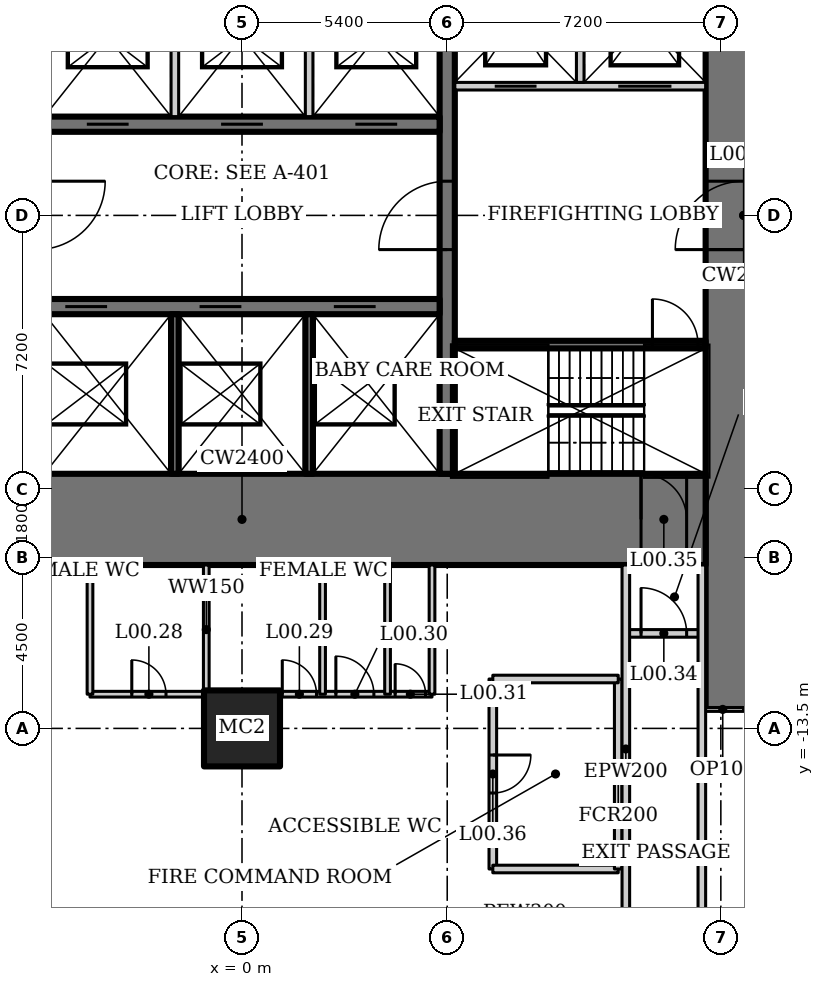
"""IFC4 building model, lengths in metres.
Left out: names, types, materials, properties, quantities, classifications, styles, units other than length and angle.
Written with IfcOpenShell. Run it as: python <this file> out.ifc"""

import sys

from ifc_helpers import new_model, si_unit, direction, frame, frame_2d, origin, origin_2d, place, context, subcontext, project, spatial, rectangle, hollow_rectangle, extrude, element, fill, save


model = new_model("IFC4")
c1 = context("Model", 3, precision=1e-05, world=origin(), true_north=direction((0.0, 1.0)))
c2 = subcontext(c1, "Body", "Model", "MODEL_VIEW")
j1 = project(units=[si_unit("LENGTHUNIT", "METRE"), si_unit("PLANEANGLEUNIT", "RADIAN")], contexts=[c1])
p1 = place(None, origin())
s1 = spatial("IfcSite", under=j1, at=p1, CompositionType="ELEMENT")
p2 = place(p1, origin())
s2 = spatial("IfcBuilding", under=s1, at=p2, CompositionType="ELEMENT")
p3 = place(p2, origin())
s3 = spatial("IfcBuildingStorey", under=s2, at=p3, CompositionType="ELEMENT", Elevation=0.0)
p4 = place(p3, frame((0.0, -13.5, 0.0), z_axis=(0.0, 0.0, 1.0), x_axis=(1.0, 0.0, 0.0)))
e1 = element("IfcColumn", 1, at=p4, inside=s3, PredefinedType="COLUMN", context=c2, shape_type="SweptSolid", body=[
    extrude(hollow_rectangle(XDim=2.0, YDim=2.0, WallThickness=0.17, at=origin_2d()), origin(), (0.0, 0.0, 1.0), 6.5),
])
p5 = place(p3, frame((13.2, -13.0, 0.0), z_axis=(0.0, 0.0, 1.0), x_axis=(0.0, 1.0, 0.0)))
e2 = element("IfcWall", 2, at=p5, inside=s3, PredefinedType="SHEAR", context=c2, shape_type="SweptSolid", body=[
    extrude(rectangle(XDim=26.0, YDim=2.0, at=frame_2d((13.0, 0.0))), origin(), (0.0, 0.0, 1.0), 6.5),
])
p6 = place(p5, frame((12.1, 0.0, 0.0)))
e3 = element("IfcOpeningElement", 3, at=p6, cuts=e2, PredefinedType="OPENING", context=c2, shape_type="SweptSolid", body=[
    extrude(rectangle(XDim=1.8, YDim=2.1, at=frame_2d((0.9, 1.05))), frame((0.0, 1.01, 0.0), z_axis=(0.0, -1.0, 0.0), x_axis=(1.0, 0.0, 0.0)), (0.0, 0.0, 1.0), 2.02),
])
p7 = place(p3, frame((-12.2, -8.0, 0.0), z_axis=(0.0, 0.0, 1.0), x_axis=(1.0, 0.0, 0.0)))
e4 = element("IfcWall", 4, at=p7, inside=s3, PredefinedType="SHEAR", context=c2, shape_type="SweptSolid", body=[
    extrude(rectangle(XDim=24.4, YDim=2.4, at=frame_2d((12.2, 0.0))), origin(), (0.0, 0.0, 1.0), 6.5),
])
p8 = place(p7, frame((0.5, 0.0, 0.0)))
e5 = element("IfcOpeningElement", 5, at=p8, cuts=e4, PredefinedType="OPENING", context=c2, shape_type="SweptSolid", body=[
    extrude(rectangle(XDim=1.2, YDim=2.1, at=frame_2d((0.6, 1.05))), frame((0.0, 1.21, 0.0), z_axis=(0.0, -1.0, 0.0), x_axis=(1.0, 0.0, 0.0)), (0.0, 0.0, 1.0), 2.42),
])
p9 = place(p7, frame((22.7, 0.0, 0.0)))
e6 = element("IfcOpeningElement", 6, at=p9, cuts=e4, PredefinedType="OPENING", context=c2, shape_type="SweptSolid", body=[
    extrude(rectangle(XDim=1.2, YDim=2.1, at=frame_2d((0.6, 1.05))), frame((0.0, 1.21, 0.0), z_axis=(0.0, -1.0, 0.0), x_axis=(1.0, 0.0, 0.0)), (0.0, 0.0, 1.0), 2.42),
])
p10 = place(p3, frame((5.4, -6.8, 0.0), z_axis=(0.0, 0.0, 1.0), x_axis=(0.0, 1.0, 0.0)))
e7 = element("IfcWall", 7, at=p10, inside=s3, PredefinedType="SHEAR", context=c2, shape_type="SweptSolid", body=[
    extrude(rectangle(XDim=13.6, YDim=0.4, at=frame_2d((6.8, 0.0))), origin(), (0.0, 0.0, 1.0), 6.5),
])
p11 = place(p10, frame((5.9, 0.0, 0.0)))
e8 = element("IfcOpeningElement", 8, at=p11, cuts=e7, PredefinedType="OPENING", context=c2, shape_type="SweptSolid", body=[
    extrude(rectangle(XDim=1.8, YDim=2.1, at=frame_2d((0.9, 1.05))), frame((0.0, 0.21, 0.0), z_axis=(0.0, -1.0, 0.0), x_axis=(1.0, 0.0, 0.0)), (0.0, 0.0, 1.0), 0.42),
])
p12 = place(p3, frame((-5.2, -2.4, 0.0), z_axis=(0.0, 0.0, 1.0), x_axis=(1.0, 0.0, 0.0)))
e9 = element("IfcWall", 9, at=p12, inside=s3, PredefinedType="SHEAR", context=c2, shape_type="SweptSolid", body=[
    extrude(rectangle(XDim=10.4, YDim=0.4, at=frame_2d((5.2, 0.0))), origin(), (0.0, 0.0, 1.0), 6.5),
])
p13 = place(p12, frame((0.55, 0.0, 0.0)))
e10 = element("IfcOpeningElement", 10, at=p13, cuts=e9, PredefinedType="OPENING", context=c2, shape_type="SweptSolid", body=[
    extrude(rectangle(XDim=1.1, YDim=2.2, at=frame_2d((0.55, 1.1))), frame((0.0, 0.21, 0.0), z_axis=(0.0, -1.0, 0.0), x_axis=(1.0, 0.0, 0.0)), (0.0, 0.0, 1.0), 0.42),
])
p14 = place(p12, frame((4.083, 0.0, 0.0)))
e11 = element("IfcOpeningElement", 11, at=p14, cuts=e9, PredefinedType="OPENING", context=c2, shape_type="SweptSolid", body=[
    extrude(rectangle(XDim=1.1, YDim=2.2, at=frame_2d((0.55, 1.1))), frame((0.0, 0.21, 0.0), z_axis=(0.0, -1.0, 0.0), x_axis=(1.0, 0.0, 0.0)), (0.0, 0.0, 1.0), 0.42),
])
p15 = place(p12, frame((7.617, 0.0, 0.0)))
e12 = element("IfcOpeningElement", 12, at=p15, cuts=e9, PredefinedType="OPENING", context=c2, shape_type="SweptSolid", body=[
    extrude(rectangle(XDim=1.1, YDim=2.2, at=frame_2d((0.55, 1.1))), frame((0.0, 0.21, 0.0), z_axis=(0.0, -1.0, 0.0), x_axis=(1.0, 0.0, 0.0)), (0.0, 0.0, 1.0), 0.42),
])
for number, where, z_axis, x_axis in (
    (13, (-1.767, -2.6, 0.0), (0.0, 0.0, 1.0), (0.0, -1.0, 0.0)),
    (14, (1.767, -2.6, 0.0), (0.0, 0.0, 1.0), (0.0, -1.0, 0.0)),
):
    element("IfcWall", number, at=place(p3, frame(where, z_axis=z_axis, x_axis=x_axis)), inside=s3, PredefinedType="SOLIDWALL", context=c2, shape_type="SweptSolid", body=[
        extrude(rectangle(XDim=4.2, YDim=0.2, at=frame_2d((2.1, 0.0))), origin(), (0.0, 0.0, 1.0), 6.5),
    ])
p16 = place(p3, frame((5.2, 2.4, 0.0), z_axis=(0.0, 0.0, 1.0), x_axis=(-1.0, 0.0, 0.0)))
e15 = element("IfcWall", 15, at=p16, inside=s3, PredefinedType="SHEAR", context=c2, shape_type="SweptSolid", body=[
    extrude(rectangle(XDim=10.4, YDim=0.4, at=frame_2d((5.2, 0.0))), origin(), (0.0, 0.0, 1.0), 6.5),
])
p17 = place(p16, frame((8.183, 0.0, 0.0)))
e16 = element("IfcOpeningElement", 16, at=p17, cuts=e15, PredefinedType="OPENING", context=c2, shape_type="SweptSolid", body=[
    extrude(rectangle(XDim=1.1, YDim=2.2, at=frame_2d((0.55, 1.1))), frame((0.0, 0.21, 0.0), z_axis=(0.0, -1.0, 0.0), x_axis=(1.0, 0.0, 0.0)), (0.0, 0.0, 1.0), 0.42),
])
p18 = place(p16, frame((4.65, 0.0, 0.0)))
e17 = element("IfcOpeningElement", 17, at=p18, cuts=e15, PredefinedType="OPENING", context=c2, shape_type="SweptSolid", body=[
    extrude(rectangle(XDim=1.1, YDim=2.2, at=frame_2d((0.55, 1.1))), frame((0.0, 0.21, 0.0), z_axis=(0.0, -1.0, 0.0), x_axis=(1.0, 0.0, 0.0)), (0.0, 0.0, 1.0), 0.42),
])
p19 = place(p16, frame((1.117, 0.0, 0.0)))
e18 = element("IfcOpeningElement", 18, at=p19, cuts=e15, PredefinedType="OPENING", context=c2, shape_type="SweptSolid", body=[
    extrude(rectangle(XDim=1.1, YDim=2.2, at=frame_2d((0.55, 1.1))), frame((0.0, 0.21, 0.0), z_axis=(0.0, -1.0, 0.0), x_axis=(1.0, 0.0, 0.0)), (0.0, 0.0, 1.0), 0.42),
])
for number, where, z_axis, x_axis in (
    (19, (-1.767, 2.6, 0.0), (0.0, 0.0, 1.0), (0.0, 1.0, 0.0)),
    (20, (1.767, 2.6, 0.0), (0.0, 0.0, 1.0), (0.0, 1.0, 0.0)),
):
    element("IfcWall", number, at=place(p3, frame(where, z_axis=z_axis, x_axis=x_axis)), inside=s3, PredefinedType="SOLIDWALL", context=c2, shape_type="SweptSolid", body=[
        extrude(rectangle(XDim=4.2, YDim=0.2, at=frame_2d((2.1, 0.0))), origin(), (0.0, 0.0, 1.0), 6.5),
    ])
p20 = place(p3, frame((5.6, -3.4, 0.0), z_axis=(0.0, 0.0, 1.0), x_axis=(1.0, 0.0, 0.0)))
e21 = element("IfcWall", 21, at=p20, inside=s3, PredefinedType="SHEAR", context=c2, shape_type="SweptSolid", body=[
    extrude(rectangle(XDim=6.6, YDim=0.2, at=frame_2d((3.3, 0.0))), origin(), (0.0, 0.0, 1.0), 6.5),
])
p21 = place(p20, frame((5.2, 0.0, 0.0)))
e22 = element("IfcOpeningElement", 22, at=p21, cuts=e21, PredefinedType="OPENING", context=c2, shape_type="SweptSolid", body=[
    extrude(rectangle(XDim=1.2, YDim=2.1, at=frame_2d((0.6, 1.05))), frame((0.0, 0.11, 0.0), z_axis=(0.0, -1.0, 0.0), x_axis=(1.0, 0.0, 0.0)), (0.0, 0.0, 1.0), 0.22),
])
p22 = place(p3, frame((12.2, 3.4, 0.0), z_axis=(0.0, 0.0, 1.0), x_axis=(-1.0, 0.0, 0.0)))
e23 = element("IfcWall", 23, at=p22, inside=s3, PredefinedType="SOLIDWALL", context=c2, shape_type="SweptSolid", body=[
    extrude(rectangle(XDim=6.6, YDim=0.2, at=frame_2d((3.3, 0.0))), origin(), (0.0, 0.0, 1.0), 6.5),
])
p23 = place(p22, frame((4.45, 0.0, 0.0)))
e24 = element("IfcOpeningElement", 24, at=p23, cuts=e23, PredefinedType="OPENING", context=c2, shape_type="SweptSolid", body=[
    extrude(rectangle(XDim=1.1, YDim=2.2, at=frame_2d((0.55, 1.1))), frame((0.0, 0.11, 0.0), z_axis=(0.0, -1.0, 0.0), x_axis=(1.0, 0.0, 0.0)), (0.0, 0.0, 1.0), 0.22),
])
p24 = place(p22, frame((0.9, 0.0, 0.0)))
e25 = element("IfcOpeningElement", 25, at=p24, cuts=e23, PredefinedType="OPENING", context=c2, shape_type="SweptSolid", body=[
    extrude(rectangle(XDim=1.4, YDim=2.2, at=frame_2d((0.7, 1.1))), frame((0.0, 0.11, 0.0), z_axis=(0.0, -1.0, 0.0), x_axis=(1.0, 0.0, 0.0)), (0.0, 0.0, 1.0), 0.22),
])
p25 = place(p3, frame((8.9, 3.5, 0.0), z_axis=(0.0, 0.0, 1.0), x_axis=(0.0, 1.0, 0.0)))
e26 = element("IfcWall", 26, at=p25, inside=s3, PredefinedType="SOLIDWALL", context=c2, shape_type="SweptSolid", body=[
    extrude(rectangle(XDim=3.3, YDim=0.2, at=frame_2d((1.65, 0.0))), origin(), (0.0, 0.0, 1.0), 6.5),
])
p26 = place(p3, frame((-4.0, -12.6, 0.0), z_axis=(0.0, 0.0, 1.0), x_axis=(1.0, 0.0, 0.0)))
e27 = element("IfcWall", 27, at=p26, inside=s3, PredefinedType="SOLIDWALL", context=c2, shape_type="SweptSolid", body=[
    extrude(rectangle(XDim=9.0, YDim=0.15, at=frame_2d((4.5, 0.0))), origin(), (0.0, 0.0, 1.0), 6.3),
])
p27 = place(p26, frame((1.1, 0.0, 0.0)))
e28 = element("IfcOpeningElement", 28, at=p27, cuts=e27, PredefinedType="OPENING", context=c2, shape_type="SweptSolid", body=[
    extrude(rectangle(XDim=0.9, YDim=2.1, at=frame_2d((0.45, 1.05))), frame((0.0, 0.085, 0.0), z_axis=(0.0, -1.0, 0.0), x_axis=(1.0, 0.0, 0.0)), (0.0, 0.0, 1.0), 0.17),
])
p28 = place(p26, frame((5.06, 0.0, 0.0)))
e29 = element("IfcOpeningElement", 29, at=p28, cuts=e27, PredefinedType="OPENING", context=c2, shape_type="SweptSolid", body=[
    extrude(rectangle(XDim=0.9, YDim=2.1, at=frame_2d((0.45, 1.05))), frame((0.0, 0.085, 0.0), z_axis=(0.0, -1.0, 0.0), x_axis=(1.0, 0.0, 0.0)), (0.0, 0.0, 1.0), 0.17),
])
p29 = place(p26, frame((6.47, 0.0, 0.0)))
e30 = element("IfcOpeningElement", 30, at=p29, cuts=e27, PredefinedType="OPENING", context=c2, shape_type="SweptSolid", body=[
    extrude(rectangle(XDim=1.0, YDim=2.1, at=frame_2d((0.5, 1.05))), frame((0.0, 0.085, 0.0), z_axis=(0.0, -1.0, 0.0), x_axis=(1.0, 0.0, 0.0)), (0.0, 0.0, 1.0), 0.17),
])
p30 = place(p26, frame((8.03, 0.0, 0.0)))
e31 = element("IfcOpeningElement", 31, at=p30, cuts=e27, PredefinedType="OPENING", context=c2, shape_type="SweptSolid", body=[
    extrude(rectangle(XDim=0.8, YDim=2.1, at=frame_2d((0.4, 1.05))), frame((0.0, 0.085, 0.0), z_axis=(0.0, -1.0, 0.0), x_axis=(1.0, 0.0, 0.0)), (0.0, 0.0, 1.0), 0.17),
])
for number, where, z_axis, x_axis in (
    (32, (-4.0, -9.2, 0.0), (0.0, 0.0, 1.0), (0.0, -1.0, 0.0)),
    (33, (5.0, -9.2, 0.0), (0.0, 0.0, 1.0), (0.0, -1.0, 0.0)),
    (34, (-0.94, -9.2, 0.0), (0.0, 0.0, 1.0), (0.0, -1.0, 0.0)),
):
    element("IfcWall", number, at=place(p3, frame(where, z_axis=z_axis, x_axis=x_axis)), inside=s3, PredefinedType="SOLIDWALL", context=c2, shape_type="SweptSolid", body=[
        extrude(rectangle(XDim=3.4, YDim=0.15, at=frame_2d((1.7, 0.0))), origin(), (0.0, 0.0, 1.0), 6.3),
    ])
p31 = place(p3, frame((2.12, -9.2, 0.0), z_axis=(0.0, 0.0, 1.0), x_axis=(0.0, -1.0, 0.0)))
e35 = element("IfcWall", 35, at=p31, inside=s3, PredefinedType="SOLIDWALL", context=c2, shape_type="SweptSolid", body=[
    extrude(rectangle(XDim=3.4, YDim=0.15, at=frame_2d((1.7, 0.0))), origin(), (0.0, 0.0, 1.0), 5.378),
])
p32 = place(p3, frame((3.83, -9.2, 0.0), z_axis=(0.0, 0.0, 1.0), x_axis=(0.0, -1.0, 0.0)))
e36 = element("IfcWall", 36, at=p32, inside=s3, PredefinedType="SOLIDWALL", context=c2, shape_type="SweptSolid", body=[
    extrude(rectangle(XDim=3.4, YDim=0.15, at=frame_2d((1.7, 0.0))), origin(), (0.0, 0.0, 1.0), 6.3),
])
p33 = place(p3, frame((10.1, -11.0, 0.0), z_axis=(0.0, 0.0, 1.0), x_axis=(1.0, 0.0, 0.0)))
e37 = element("IfcWall", 37, at=p33, inside=s3, PredefinedType="SOLIDWALL", context=c2, shape_type="SweptSolid", body=[
    extrude(rectangle(XDim=2.0, YDim=0.2, at=frame_2d((1.0, 0.0))), origin(), (0.0, 0.0, 1.0), 6.3),
])
p34 = place(p33, frame((0.4, 0.0, 0.0)))
e38 = element("IfcOpeningElement", 38, at=p34, cuts=e37, PredefinedType="OPENING", context=c2, shape_type="SweptSolid", body=[
    extrude(rectangle(XDim=1.2, YDim=2.1, at=frame_2d((0.6, 1.05))), frame((0.0, 0.11, 0.0), z_axis=(0.0, -1.0, 0.0), x_axis=(1.0, 0.0, 0.0)), (0.0, 0.0, 1.0), 0.22),
])
p35 = place(p3, frame((6.6, -12.2, 0.0), z_axis=(0.0, 0.0, 1.0), x_axis=(0.0, -1.0, 0.0)))
e39 = element("IfcWall", 39, at=p35, inside=s3, PredefinedType="SOLIDWALL", context=c2, shape_type="SweptSolid", body=[
    extrude(rectangle(XDim=5.0, YDim=0.2, at=frame_2d((2.5, 0.0))), origin(), (0.0, 0.0, 1.0), 6.3),
])
p36 = place(p35, frame((2.0, 0.0, 0.0)))
e40 = element("IfcOpeningElement", 40, at=p36, cuts=e39, PredefinedType="OPENING", context=c2, shape_type="SweptSolid", body=[
    extrude(rectangle(XDim=1.0, YDim=2.1, at=frame_2d((0.5, 1.05))), frame((0.0, 0.11, 0.0), z_axis=(0.0, -1.0, 0.0), x_axis=(1.0, 0.0, 0.0)), (0.0, 0.0, 1.0), 0.22),
])
p37 = place(p3, frame((6.6, -17.2, 0.0), z_axis=(0.0, 0.0, 1.0), x_axis=(1.0, 0.0, 0.0)))
e41 = element("IfcWall", 41, at=p37, inside=s3, PredefinedType="SOLIDWALL", context=c2, shape_type="SweptSolid", body=[
    extrude(rectangle(XDim=3.3, YDim=0.2, at=frame_2d((1.65, 0.0))), origin(), (0.0, 0.0, 1.0), 6.3),
])
p38 = place(p3, frame((9.9, -17.2, 0.0), z_axis=(0.0, 0.0, 1.0), x_axis=(0.0, 1.0, 0.0)))
e42 = element("IfcWall", 42, at=p38, inside=s3, PredefinedType="SOLIDWALL", context=c2, shape_type="SweptSolid", body=[
    extrude(rectangle(XDim=5.0, YDim=0.2, at=frame_2d((2.5, 0.0))), origin(), (0.0, 0.0, 1.0), 6.3),
])
p39 = place(p3, frame((9.9, -12.2, 0.0), z_axis=(0.0, 0.0, 1.0), x_axis=(-1.0, 0.0, 0.0)))
e43 = element("IfcWall", 43, at=p39, inside=s3, PredefinedType="SOLIDWALL", context=c2, shape_type="SweptSolid", body=[
    extrude(rectangle(XDim=3.3, YDim=0.2, at=frame_2d((1.65, 0.0))), origin(), (0.0, 0.0, 1.0), 6.3),
])
p40 = place(p3, frame((13.2, -13.0, 0.0), z_axis=(0.0, 0.0, 1.0), x_axis=(-1.0, 0.0, 0.0)))
e44 = element("IfcWall", 44, at=p40, inside=s3, PredefinedType="PARTITIONING", context=c2, shape_type="SweptSolid", body=[
    extrude(rectangle(XDim=1.1, YDim=0.1, at=frame_2d((0.55, 0.0))), origin(), (0.0, 0.0, 1.0), 6.3),
])
p41 = place(p3, frame((10.1, -9.2, 0.0), z_axis=(0.0, 0.0, 1.0), x_axis=(0.0, -1.0, 0.0)))
e45 = element("IfcWall", 45, at=p41, inside=s3, PredefinedType="SOLIDWALL", context=c2, shape_type="SweptSolid", body=[
    extrude(rectangle(XDim=9.684, YDim=0.2, at=frame_2d((4.842, 0.0))), origin(), (0.0, 0.0, 1.0), 6.3),
])
p42 = place(p3, frame((12.1, -20.146, 0.0), z_axis=(0.0, 0.0, 1.0), x_axis=(0.0, 1.0, 0.0)))
e46 = element("IfcWall", 46, at=p42, inside=s3, PredefinedType="SOLIDWALL", context=c2, shape_type="SweptSolid", body=[
    extrude(rectangle(XDim=10.946, YDim=0.2, at=frame_2d((5.473, 0.0))), origin(), (0.0, 0.0, 1.0), 6.3),
])
p43 = place(p11, origin())
e47 = element("IfcDoor", 47, at=p43, inside=s3, OperationType="DOUBLE_DOOR_DOUBLE_SWING", PredefinedType="DOOR", context=c2, shape_type="SweptSolid", body=[
    extrude(rectangle(XDim=1.8, YDim=2.1, at=frame_2d((0.9, 1.05))), frame((0.0, 0.025, 0.0), z_axis=(0.0, -1.0, 0.0), x_axis=(1.0, 0.0, 0.0)), (0.0, 0.0, 1.0), 0.05),
])
fill(e8, e47)
p44 = place(p21, origin())
e48 = element("IfcDoor", 48, at=p44, inside=s3, OperationType="SINGLE_SWING_RIGHT", PredefinedType="DOOR", context=c2, shape_type="SweptSolid", body=[
    extrude(rectangle(XDim=1.2, YDim=2.1, at=frame_2d((0.6, 1.05))), frame((0.0, 0.025, 0.0), z_axis=(0.0, -1.0, 0.0), x_axis=(1.0, 0.0, 0.0)), (0.0, 0.0, 1.0), 0.05),
])
fill(e22, e48)
p45 = place(p6, origin())
e49 = element("IfcDoor", 49, at=p45, inside=s3, OperationType="DOUBLE_DOOR_DOUBLE_SWING", PredefinedType="DOOR", context=c2, shape_type="SweptSolid", body=[
    extrude(rectangle(XDim=1.8, YDim=2.1, at=frame_2d((0.9, 1.05))), frame((0.0, 0.025, 0.0), z_axis=(0.0, -1.0, 0.0), x_axis=(1.0, 0.0, 0.0)), (0.0, 0.0, 1.0), 0.05),
])
fill(e3, e49)
p46 = place(p17, origin())
e50 = element("IfcDoor", 50, at=p46, inside=s3, OperationType="DOUBLE_DOOR_SLIDING", PredefinedType="DOOR", context=c2, shape_type="SweptSolid", body=[
    extrude(rectangle(XDim=1.1, YDim=2.2, at=frame_2d((0.55, 1.1))), frame((0.0, 0.025, 0.0), z_axis=(0.0, -1.0, 0.0), x_axis=(1.0, 0.0, 0.0)), (0.0, 0.0, 1.0), 0.05),
])
fill(e16, e50)
p47 = place(p13, origin())
e51 = element("IfcDoor", 51, at=p47, inside=s3, OperationType="DOUBLE_DOOR_SLIDING", PredefinedType="DOOR", context=c2, shape_type="SweptSolid", body=[
    extrude(rectangle(XDim=1.1, YDim=2.2, at=frame_2d((0.55, 1.1))), frame((0.0, 0.025, 0.0), z_axis=(0.0, -1.0, 0.0), x_axis=(1.0, 0.0, 0.0)), (0.0, 0.0, 1.0), 0.05),
])
fill(e10, e51)
p48 = place(p18, origin())
e52 = element("IfcDoor", 52, at=p48, inside=s3, OperationType="DOUBLE_DOOR_SLIDING", PredefinedType="DOOR", context=c2, shape_type="SweptSolid", body=[
    extrude(rectangle(XDim=1.1, YDim=2.2, at=frame_2d((0.55, 1.1))), frame((0.0, 0.025, 0.0), z_axis=(0.0, -1.0, 0.0), x_axis=(1.0, 0.0, 0.0)), (0.0, 0.0, 1.0), 0.05),
])
fill(e17, e52)
p49 = place(p14, origin())
e53 = element("IfcDoor", 53, at=p49, inside=s3, OperationType="DOUBLE_DOOR_SLIDING", PredefinedType="DOOR", context=c2, shape_type="SweptSolid", body=[
    extrude(rectangle(XDim=1.1, YDim=2.2, at=frame_2d((0.55, 1.1))), frame((0.0, 0.025, 0.0), z_axis=(0.0, -1.0, 0.0), x_axis=(1.0, 0.0, 0.0)), (0.0, 0.0, 1.0), 0.05),
])
fill(e11, e53)
p50 = place(p19, origin())
e54 = element("IfcDoor", 54, at=p50, inside=s3, OperationType="DOUBLE_DOOR_SLIDING", PredefinedType="DOOR", context=c2, shape_type="SweptSolid", body=[
    extrude(rectangle(XDim=1.1, YDim=2.2, at=frame_2d((0.55, 1.1))), frame((0.0, 0.025, 0.0), z_axis=(0.0, -1.0, 0.0), x_axis=(1.0, 0.0, 0.0)), (0.0, 0.0, 1.0), 0.05),
])
fill(e18, e54)
p51 = place(p15, origin())
e55 = element("IfcDoor", 55, at=p51, inside=s3, OperationType="DOUBLE_DOOR_SLIDING", PredefinedType="DOOR", context=c2, shape_type="SweptSolid", body=[
    extrude(rectangle(XDim=1.1, YDim=2.2, at=frame_2d((0.55, 1.1))), frame((0.0, 0.025, 0.0), z_axis=(0.0, -1.0, 0.0), x_axis=(1.0, 0.0, 0.0)), (0.0, 0.0, 1.0), 0.05),
])
fill(e12, e55)
p52 = place(p23, origin())
e56 = element("IfcDoor", 56, at=p52, inside=s3, OperationType="DOUBLE_DOOR_SLIDING", PredefinedType="DOOR", context=c2, shape_type="SweptSolid", body=[
    extrude(rectangle(XDim=1.1, YDim=2.2, at=frame_2d((0.55, 1.1))), frame((0.0, 0.025, 0.0), z_axis=(0.0, -1.0, 0.0), x_axis=(1.0, 0.0, 0.0)), (0.0, 0.0, 1.0), 0.05),
])
fill(e24, e56)
p53 = place(p24, origin())
e57 = element("IfcDoor", 57, at=p53, inside=s3, OperationType="DOUBLE_DOOR_SLIDING", PredefinedType="DOOR", context=c2, shape_type="SweptSolid", body=[
    extrude(rectangle(XDim=1.4, YDim=2.2, at=frame_2d((0.7, 1.1))), frame((0.0, 0.025, 0.0), z_axis=(0.0, -1.0, 0.0), x_axis=(1.0, 0.0, 0.0)), (0.0, 0.0, 1.0), 0.05),
])
fill(e25, e57)
p54 = place(p27, origin())
e58 = element("IfcDoor", 58, at=p54, inside=s3, OperationType="SINGLE_SWING_LEFT", PredefinedType="DOOR", context=c2, shape_type="SweptSolid", body=[
    extrude(rectangle(XDim=0.9, YDim=2.1, at=frame_2d((0.45, 1.05))), frame((0.0, 0.025, 0.0), z_axis=(0.0, -1.0, 0.0), x_axis=(1.0, 0.0, 0.0)), (0.0, 0.0, 1.0), 0.05),
])
fill(e28, e58)
p55 = place(p28, origin())
e59 = element("IfcDoor", 59, at=p55, inside=s3, OperationType="SINGLE_SWING_LEFT", PredefinedType="DOOR", context=c2, shape_type="SweptSolid", body=[
    extrude(rectangle(XDim=0.9, YDim=2.1, at=frame_2d((0.45, 1.05))), frame((0.0, 0.025, 0.0), z_axis=(0.0, -1.0, 0.0), x_axis=(1.0, 0.0, 0.0)), (0.0, 0.0, 1.0), 0.05),
])
fill(e29, e59)
p56 = place(p29, origin())
e60 = element("IfcDoor", 60, at=p56, inside=s3, OperationType="SINGLE_SWING_LEFT", PredefinedType="DOOR", context=c2, shape_type="SweptSolid", body=[
    extrude(rectangle(XDim=1.0, YDim=2.1, at=frame_2d((0.5, 1.05))), frame((0.0, 0.025, 0.0), z_axis=(0.0, -1.0, 0.0), x_axis=(1.0, 0.0, 0.0)), (0.0, 0.0, 1.0), 0.05),
])
fill(e30, e60)
p57 = place(p30, origin())
e61 = element("IfcDoor", 61, at=p57, inside=s3, OperationType="SINGLE_SWING_LEFT", PredefinedType="DOOR", context=c2, shape_type="SweptSolid", body=[
    extrude(rectangle(XDim=0.8, YDim=2.1, at=frame_2d((0.4, 1.05))), frame((0.0, 0.025, 0.0), z_axis=(0.0, -1.0, 0.0), x_axis=(1.0, 0.0, 0.0)), (0.0, 0.0, 1.0), 0.05),
])
fill(e31, e61)
p58 = place(p34, origin())
e62 = element("IfcDoor", 62, at=p58, inside=s3, OperationType="SINGLE_SWING_RIGHT", PredefinedType="DOOR", context=c2, shape_type="SweptSolid", body=[
    extrude(rectangle(XDim=1.2, YDim=2.1, at=frame_2d((0.6, 1.05))), frame((0.0, 0.025, 0.0), z_axis=(0.0, -1.0, 0.0), x_axis=(1.0, 0.0, 0.0)), (0.0, 0.0, 1.0), 0.05),
])
fill(e38, e62)
p59 = place(p9, origin())
e63 = element("IfcDoor", 63, at=p59, inside=s3, OperationType="SINGLE_SWING_LEFT", PredefinedType="DOOR", context=c2, shape_type="SweptSolid", body=[
    extrude(rectangle(XDim=1.2, YDim=2.1, at=frame_2d((0.6, 1.05))), frame((0.0, 0.025, 0.0), z_axis=(0.0, -1.0, 0.0), x_axis=(1.0, 0.0, 0.0)), (0.0, 0.0, 1.0), 0.05),
])
fill(e6, e63)
p60 = place(p36, origin())
e64 = element("IfcDoor", 64, at=p60, inside=s3, OperationType="SINGLE_SWING_LEFT", PredefinedType="DOOR", context=c2, shape_type="SweptSolid", body=[
    extrude(rectangle(XDim=1.0, YDim=2.1, at=frame_2d((0.5, 1.05))), frame((0.0, 0.025, 0.0), z_axis=(0.0, -1.0, 0.0), x_axis=(1.0, 0.0, 0.0)), (0.0, 0.0, 1.0), 0.05),
])
fill(e40, e64)
save(model, sys.argv[1])
